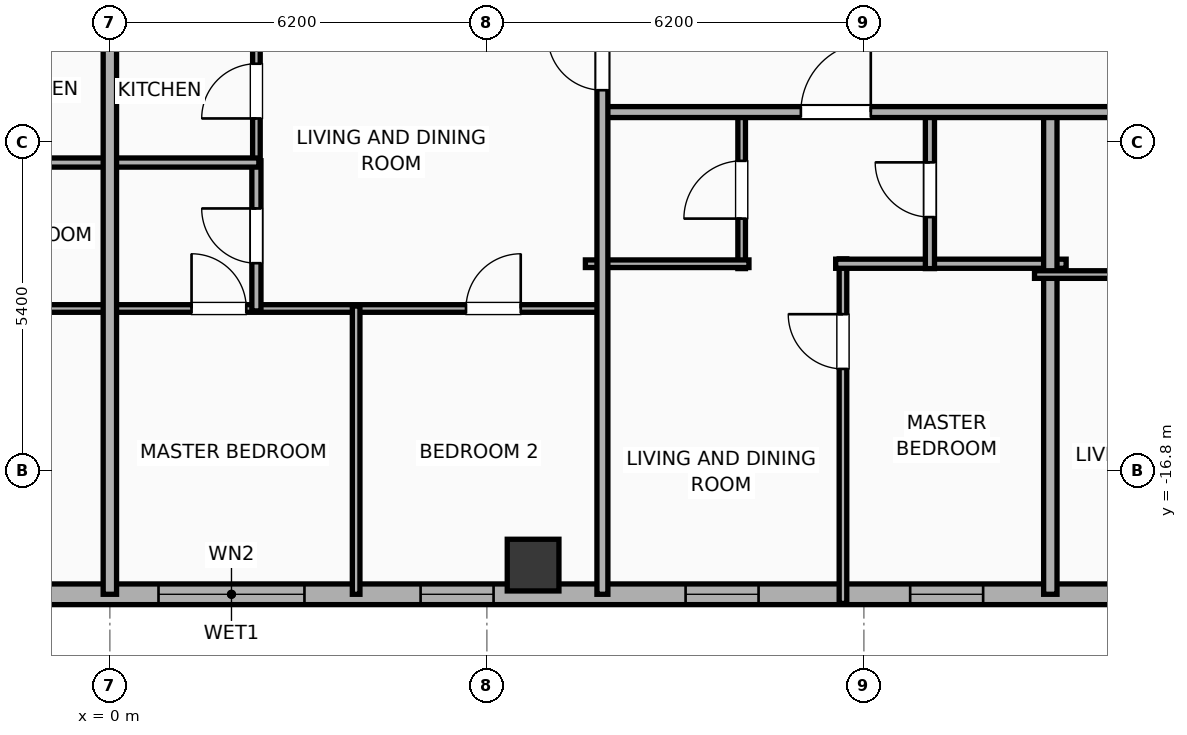
"""IFC4 building model, lengths in metres.
Left out: names, types, materials, properties, quantities, classifications, styles, units other than length and angle.
Written with IfcOpenShell. Run it as: python <this file> out.ifc"""

import sys

from ifc_helpers import new_model, si_unit, direction, frame, frame_2d, origin, origin_2d, place, context, subcontext, project, spatial, rectangle, hollow_rectangle, extrude, element, fill, save


model = new_model("IFC4")
c1 = context("Model", 3, precision=1e-05, world=origin(), true_north=direction((0.0, 1.0)))
c2 = subcontext(c1, "Body", "Model", "MODEL_VIEW")
j1 = project(units=[si_unit("LENGTHUNIT", "METRE"), si_unit("PLANEANGLEUNIT", "RADIAN")], contexts=[c1])
p1 = place(None, origin())
s1 = spatial("IfcSite", under=j1, at=p1, CompositionType="ELEMENT")
p2 = place(p1, origin())
s2 = spatial("IfcBuilding", under=s1, at=p2, CompositionType="ELEMENT")
p3 = place(p2, frame((0.0, 0.0, 243.1)))
s3 = spatial("IfcBuildingStorey", under=s2, at=p3, CompositionType="ELEMENT", Elevation=243.1)
p4 = place(p3, frame((6.96, -18.35, 0.0), z_axis=(0.0, 0.0, 1.0), x_axis=(1.0, 0.0, 0.0)))
e1 = element("IfcColumn", 1, at=p4, inside=s3, PredefinedType="COLUMN", context=c2, shape_type="SweptSolid", body=[
    extrude(hollow_rectangle(XDim=0.85, YDim=0.85, WallThickness=0.028, at=origin_2d()), origin(), (0.0, 0.0, 1.0), 3.9),
])
p5 = place(p3, frame((26.783, -18.83, 0.0), z_axis=(0.0, 0.0, 1.0), x_axis=(-1.0, 0.0, 0.0)))
e2 = element("IfcWall", 2, at=p5, inside=s3, PredefinedType="ELEMENTEDWALL", context=c2, shape_type="SweptSolid", body=[
    extrude(rectangle(XDim=49.566, YDim=0.34, at=frame_2d((24.783, 0.0))), origin(), (0.0, 0.0, 1.0), 3.65),
])
p6 = place(p5, frame((23.583, 0.0, 0.75)))
e3 = element("IfcOpeningElement", 3, at=p6, cuts=e2, PredefinedType="OPENING", context=c2, shape_type="SweptSolid", body=[
    extrude(rectangle(XDim=2.4, YDim=2.1, at=frame_2d((1.2, 1.05))), frame((0.0, 0.18, 0.0), z_axis=(0.0, -1.0, 0.0), x_axis=(1.0, 0.0, 0.0)), (0.0, 0.0, 1.0), 0.36),
])
p7 = place(p5, frame((41.756, 0.0, 0.75)))
e4 = element("IfcOpeningElement", 4, at=p7, cuts=e2, PredefinedType="OPENING", context=c2, shape_type="SweptSolid", body=[
    extrude(rectangle(XDim=2.4, YDim=2.1, at=frame_2d((1.2, 1.05))), frame((0.0, 0.18, 0.0), z_axis=(0.0, -1.0, 0.0), x_axis=(1.0, 0.0, 0.0)), (0.0, 0.0, 1.0), 0.36),
])
p8 = place(p5, frame((47.222, 0.0, 0.75)))
e5 = element("IfcOpeningElement", 5, at=p8, cuts=e2, PredefinedType="OPENING", context=c2, shape_type="SweptSolid", body=[
    extrude(rectangle(XDim=1.2, YDim=2.05, at=frame_2d((0.6, 1.025))), frame((0.0, 0.18, 0.0), z_axis=(0.0, -1.0, 0.0), x_axis=(1.0, 0.0, 0.0)), (0.0, 0.0, 1.0), 0.36),
])
p9 = place(p5, frame((45.263, 0.0, 0.75)))
e6 = element("IfcOpeningElement", 6, at=p9, cuts=e2, PredefinedType="OPENING", context=c2, shape_type="SweptSolid", body=[
    extrude(rectangle(XDim=1.2, YDim=2.05, at=frame_2d((0.6, 1.025))), frame((0.0, 0.18, 0.0), z_axis=(0.0, -1.0, 0.0), x_axis=(1.0, 0.0, 0.0)), (0.0, 0.0, 1.0), 0.36),
])
p10 = place(p5, frame((37.289, 0.0, 0.75)))
e7 = element("IfcOpeningElement", 7, at=p10, cuts=e2, PredefinedType="OPENING", context=c2, shape_type="SweptSolid", body=[
    extrude(rectangle(XDim=1.2, YDim=2.05, at=frame_2d((0.6, 1.025))), frame((0.0, 0.18, 0.0), z_axis=(0.0, -1.0, 0.0), x_axis=(1.0, 0.0, 0.0)), (0.0, 0.0, 1.0), 0.36),
])
p11 = place(p5, frame((16.115, 0.0, 0.75)))
e8 = element("IfcOpeningElement", 8, at=p11, cuts=e2, PredefinedType="OPENING", context=c2, shape_type="SweptSolid", body=[
    extrude(rectangle(XDim=1.2, YDim=2.05, at=frame_2d((0.6, 1.025))), frame((0.0, 0.18, 0.0), z_axis=(0.0, -1.0, 0.0), x_axis=(1.0, 0.0, 0.0)), (0.0, 0.0, 1.0), 0.36),
])
p12 = place(p5, frame((12.422, 0.0, 0.75)))
e9 = element("IfcOpeningElement", 9, at=p12, cuts=e2, PredefinedType="OPENING", context=c2, shape_type="SweptSolid", body=[
    extrude(rectangle(XDim=1.2, YDim=2.05, at=frame_2d((0.6, 1.025))), frame((0.0, 0.18, 0.0), z_axis=(0.0, -1.0, 0.0), x_axis=(1.0, 0.0, 0.0)), (0.0, 0.0, 1.0), 0.36),
])
p13 = place(p5, frame((8.01, 0.0, 0.75)))
e10 = element("IfcOpeningElement", 10, at=p13, cuts=e2, PredefinedType="OPENING", context=c2, shape_type="SweptSolid", body=[
    extrude(rectangle(XDim=1.2, YDim=2.05, at=frame_2d((0.6, 1.025))), frame((0.0, 0.18, 0.0), z_axis=(0.0, -1.0, 0.0), x_axis=(1.0, 0.0, 0.0)), (0.0, 0.0, 1.0), 0.36),
])
p14 = place(p5, frame((5.037, 0.0, 0.75)))
e11 = element("IfcOpeningElement", 11, at=p14, cuts=e2, PredefinedType="OPENING", context=c2, shape_type="SweptSolid", body=[
    extrude(rectangle(XDim=1.2, YDim=2.05, at=frame_2d((0.6, 1.025))), frame((0.0, 0.18, 0.0), z_axis=(0.0, -1.0, 0.0), x_axis=(1.0, 0.0, 0.0)), (0.0, 0.0, 1.0), 0.36),
])
p15 = place(p5, frame((1.811, 0.0, 0.75)))
e12 = element("IfcOpeningElement", 12, at=p15, cuts=e2, PredefinedType="OPENING", context=c2, shape_type="SweptSolid", body=[
    extrude(rectangle(XDim=1.2, YDim=2.05, at=frame_2d((0.6, 1.025))), frame((0.0, 0.18, 0.0), z_axis=(0.0, -1.0, 0.0), x_axis=(1.0, 0.0, 0.0)), (0.0, 0.0, 1.0), 0.36),
])
p16 = place(p5, frame((32.253, 0.0, 0.75)))
e13 = element("IfcOpeningElement", 13, at=p16, cuts=e2, PredefinedType="OPENING", context=c2, shape_type="SweptSolid", body=[
    extrude(rectangle(XDim=1.2, YDim=2.05, at=frame_2d((0.6, 1.025))), frame((0.0, 0.18, 0.0), z_axis=(0.0, -1.0, 0.0), x_axis=(1.0, 0.0, 0.0)), (0.0, 0.0, 1.0), 0.36),
])
p17 = place(p5, frame((27.853, 0.0, 0.75)))
e14 = element("IfcOpeningElement", 14, at=p17, cuts=e2, PredefinedType="OPENING", context=c2, shape_type="SweptSolid", body=[
    extrude(rectangle(XDim=1.2, YDim=2.05, at=frame_2d((0.6, 1.025))), frame((0.0, 0.18, 0.0), z_axis=(0.0, -1.0, 0.0), x_axis=(1.0, 0.0, 0.0)), (0.0, 0.0, 1.0), 0.36),
])
p18 = place(p5, frame((20.473, 0.0, 0.75)))
e15 = element("IfcOpeningElement", 15, at=p18, cuts=e2, PredefinedType="OPENING", context=c2, shape_type="SweptSolid", body=[
    extrude(rectangle(XDim=1.2, YDim=2.05, at=frame_2d((0.6, 1.025))), frame((0.0, 0.18, 0.0), z_axis=(0.0, -1.0, 0.0), x_axis=(1.0, 0.0, 0.0)), (0.0, 0.0, 1.0), 0.36),
])
p19 = place(p3, frame((12.056, -18.98, 0.0), z_axis=(0.0, 0.0, 1.0), x_axis=(0.0, 1.0, 0.0)))
e16 = element("IfcWall", 16, at=p19, inside=s3, PredefinedType="PARTITIONING", context=c2, shape_type="SweptSolid", body=[
    extrude(rectangle(XDim=5.666, YDim=0.125, at=frame_2d((2.833, 0.0))), origin(), (0.0, 0.0, 1.0), 3.65),
])
p20 = place(p19, frame((3.856, 0.0, 0.0)))
e17 = element("IfcOpeningElement", 17, at=p20, cuts=e16, PredefinedType="OPENING", context=c2, shape_type="SweptSolid", body=[
    extrude(rectangle(XDim=0.9, YDim=2.05, at=frame_2d((0.45, 1.025))), frame((0.0, 0.073, 0.0), z_axis=(0.0, -1.0, 0.0), x_axis=(1.0, 0.0, 0.0)), (0.0, 0.0, 1.0), 0.145),
])
p21 = place(p3, frame((11.936, -13.394, 0.0), z_axis=(0.0, 0.0, 1.0), x_axis=(1.0, 0.0, 0.0)))
e18 = element("IfcWall", 18, at=p21, inside=s3, PredefinedType="PLUMBINGWALL", context=c2, shape_type="SweptSolid", body=[
    extrude(rectangle(XDim=3.79, YDim=0.15, at=frame_2d((1.895, 0.0))), origin(), (0.0, 0.0, 1.0), 3.65),
])
p22 = place(p3, frame((10.39, -13.474, 0.0), z_axis=(0.0, 0.0, 1.0), x_axis=(0.0, 1.0, 0.0)))
e19 = element("IfcWall", 19, at=p22, inside=s3, PredefinedType="PARTITIONING", context=c2, shape_type="SweptSolid", body=[
    extrude(rectangle(XDim=2.594, YDim=0.125, at=frame_2d((1.297, 0.0))), origin(), (0.0, 0.0, 1.0), 3.65),
])
p23 = place(p22, frame((0.822, 0.0, 0.0)))
e20 = element("IfcOpeningElement", 20, at=p23, cuts=e19, PredefinedType="OPENING", context=c2, shape_type="SweptSolid", body=[
    extrude(rectangle(XDim=0.95, YDim=2.05, at=frame_2d((0.475, 1.025))), frame((0.0, 0.073, 0.0), z_axis=(0.0, -1.0, 0.0), x_axis=(1.0, 0.0, 0.0)), (0.0, 0.0, 1.0), 0.145),
])
p24 = place(p3, frame((7.82, -13.394, 0.0), z_axis=(0.0, 0.0, 1.0), x_axis=(1.0, 0.0, 0.0)))
e21 = element("IfcWall", 21, at=p24, inside=s3, PredefinedType="PARTITIONING", context=c2, shape_type="SweptSolid", body=[
    extrude(rectangle(XDim=2.69, YDim=0.125, at=frame_2d((1.345, 0.0))), origin(), (0.0, 0.0, 1.0), 3.65),
])
p25 = place(p3, frame((13.486, -13.474, 0.0), z_axis=(0.0, 0.0, 1.0), x_axis=(0.0, 1.0, 0.0)))
e22 = element("IfcWall", 22, at=p25, inside=s3, PredefinedType="PLUMBINGWALL", context=c2, shape_type="SweptSolid", body=[
    extrude(rectangle(XDim=2.594, YDim=0.15, at=frame_2d((1.297, 0.0))), origin(), (0.0, 0.0, 1.0), 3.65),
])
p26 = place(p25, frame((0.847, 0.0, 0.0)))
e23 = element("IfcOpeningElement", 23, at=p26, cuts=e22, PredefinedType="OPENING", context=c2, shape_type="SweptSolid", body=[
    extrude(rectangle(XDim=0.9, YDim=2.05, at=frame_2d((0.45, 1.025))), frame((0.0, 0.085, 0.0), z_axis=(0.0, -1.0, 0.0), x_axis=(1.0, 0.0, 0.0)), (0.0, 0.0, 1.0), 0.17),
])
p27 = place(p3, frame((15.466, -18.83, 0.0), z_axis=(0.0, 0.0, 1.0), x_axis=(0.0, 1.0, 0.0)))
e24 = element("IfcWall", 24, at=p27, inside=s3, PredefinedType="PARTITIONING", context=c2, shape_type="SweptSolid", body=[
    extrude(rectangle(XDim=8.01, YDim=0.22, at=frame_2d((4.005, 0.0))), origin(), (0.0, 0.0, 1.0), 3.65),
])
p28 = place(p3, frame((15.206, -13.572, 0.0), z_axis=(0.0, 0.0, 1.0), x_axis=(1.0, 0.0, 0.0)))
e25 = element("IfcWall", 25, at=p28, inside=s3, PredefinedType="PARTITIONING", context=c2, shape_type="SweptSolid", body=[
    extrude(rectangle(XDim=2.69, YDim=0.125, at=frame_2d((1.345, 0.0))), origin(), (0.0, 0.0, 1.0), 3.65),
])
p29 = place(p3, frame((8.08, -10.9, 0.0), z_axis=(0.0, 0.0, 1.0), x_axis=(1.0, 0.0, 0.0)))
e26 = element("IfcWall", 26, at=p29, inside=s3, PredefinedType="PARTITIONING", context=c2, shape_type="SweptSolid", body=[
    extrude(rectangle(XDim=22.15, YDim=0.18, at=frame_2d((11.075, 0.0))), origin(), (0.0, 0.0, 1.0), 3.65),
])
p30 = place(p29, frame((3.283, 0.0, 0.0)))
e27 = element("IfcOpeningElement", 27, at=p30, cuts=e26, PredefinedType="OPENING", context=c2, shape_type="SweptSolid", body=[
    extrude(rectangle(XDim=1.15, YDim=2.05, at=frame_2d((0.575, 1.025))), frame((0.0, 0.1, 0.0), z_axis=(0.0, -1.0, 0.0), x_axis=(1.0, 0.0, 0.0)), (0.0, 0.0, 1.0), 0.2),
])
p31 = place(p29, frame((10.668, 0.0, 0.0)))
e28 = element("IfcOpeningElement", 28, at=p31, cuts=e26, PredefinedType="OPENING", context=c2, shape_type="SweptSolid", body=[
    extrude(rectangle(XDim=1.15, YDim=2.05, at=frame_2d((0.575, 1.025))), frame((0.0, 0.1, 0.0), z_axis=(0.0, -1.0, 0.0), x_axis=(1.0, 0.0, 0.0)), (0.0, 0.0, 1.0), 0.2),
])
p32 = place(p29, frame((18.084, 0.0, 0.0)))
e29 = element("IfcOpeningElement", 29, at=p32, cuts=e26, PredefinedType="OPENING", context=c2, shape_type="SweptSolid", body=[
    extrude(rectangle(XDim=1.15, YDim=2.05, at=frame_2d((0.575, 1.025))), frame((0.0, 0.1, 0.0), z_axis=(0.0, -1.0, 0.0), x_axis=(1.0, 0.0, 0.0)), (0.0, 0.0, 1.0), 0.2),
])
p33 = place(p3, frame((-8.08, -14.13, 0.0), z_axis=(0.0, 0.0, 1.0), x_axis=(1.0, 0.0, 0.0)))
e30 = element("IfcWall", 30, at=p33, inside=s3, PredefinedType="PARTITIONING", context=c2, shape_type="SweptSolid", body=[
    extrude(rectangle(XDim=8.06, YDim=0.125, at=frame_2d((4.03, 0.0))), origin(), (0.0, 0.0, 1.0), 3.65),
])
p34 = place(p33, frame((1.323, 0.0, 0.0)))
e31 = element("IfcOpeningElement", 31, at=p34, cuts=e30, PredefinedType="OPENING", context=c2, shape_type="SweptSolid", body=[
    extrude(rectangle(XDim=0.9, YDim=2.05, at=frame_2d((0.45, 1.025))), frame((0.0, 0.073, 0.0), z_axis=(0.0, -1.0, 0.0), x_axis=(1.0, 0.0, 0.0)), (0.0, 0.0, 1.0), 0.145),
])
p35 = place(p33, frame((4.547, 0.0, 0.0)))
e32 = element("IfcOpeningElement", 32, at=p35, cuts=e30, PredefinedType="OPENING", context=c2, shape_type="SweptSolid", body=[
    extrude(rectangle(XDim=0.9, YDim=2.05, at=frame_2d((0.45, 1.025))), frame((0.0, 0.073, 0.0), z_axis=(0.0, -1.0, 0.0), x_axis=(1.0, 0.0, 0.0)), (0.0, 0.0, 1.0), 0.145),
])
p36 = place(p3, frame((-2.45, -11.73, 0.0), z_axis=(0.0, 0.0, 1.0), x_axis=(1.0, 0.0, 0.0)))
e33 = element("IfcWall", 33, at=p36, inside=s3, PredefinedType="PLUMBINGWALL", context=c2, shape_type="SweptSolid", body=[
    extrude(rectangle(XDim=2.43, YDim=0.15, at=frame_2d((1.215, 0.0))), origin(), (0.0, 0.0, 1.0), 3.65),
])
p37 = place(p3, frame((0.02, -14.13, 0.0), z_axis=(0.0, 0.0, 1.0), x_axis=(1.0, 0.0, 0.0)))
e34 = element("IfcWall", 34, at=p37, inside=s3, PredefinedType="PARTITIONING", context=c2, shape_type="SweptSolid", body=[
    extrude(rectangle(XDim=8.06, YDim=0.125, at=frame_2d((4.03, 0.0))), origin(), (0.0, 0.0, 1.0), 3.65),
])
p38 = place(p37, frame((1.323, 0.0, 0.0)))
e35 = element("IfcOpeningElement", 35, at=p38, cuts=e34, PredefinedType="OPENING", context=c2, shape_type="SweptSolid", body=[
    extrude(rectangle(XDim=0.9, YDim=2.05, at=frame_2d((0.45, 1.025))), frame((0.0, 0.073, 0.0), z_axis=(0.0, -1.0, 0.0), x_axis=(1.0, 0.0, 0.0)), (0.0, 0.0, 1.0), 0.145),
])
p39 = place(p37, frame((5.837, 0.0, 0.0)))
e36 = element("IfcOpeningElement", 36, at=p39, cuts=e34, PredefinedType="OPENING", context=c2, shape_type="SweptSolid", body=[
    extrude(rectangle(XDim=0.9, YDim=2.05, at=frame_2d((0.45, 1.025))), frame((0.0, 0.073, 0.0), z_axis=(0.0, -1.0, 0.0), x_axis=(1.0, 0.0, 0.0)), (0.0, 0.0, 1.0), 0.145),
])
p40 = place(p3, frame((2.41, -11.76, 0.0), z_axis=(0.0, 0.0, 1.0), x_axis=(0.0, 1.0, 0.0)))
e37 = element("IfcWall", 37, at=p40, inside=s3, PredefinedType="PARTITIONING", context=c2, shape_type="SweptSolid", body=[
    extrude(rectangle(XDim=2.41, YDim=0.125, at=frame_2d((1.205, 0.0))), origin(), (0.0, 0.0, 1.0), 3.65),
])
p41 = place(p40, frame((0.755, 0.0, 0.0)))
e38 = element("IfcOpeningElement", 38, at=p41, cuts=e37, PredefinedType="OPENING", context=c2, shape_type="SweptSolid", body=[
    extrude(rectangle(XDim=0.9, YDim=2.05, at=frame_2d((0.45, 1.025))), frame((0.0, 0.073, 0.0), z_axis=(0.0, -1.0, 0.0), x_axis=(1.0, 0.0, 0.0)), (0.0, 0.0, 1.0), 0.145),
])
p42 = place(p3, frame((2.41, -14.17, 0.0), z_axis=(0.0, 0.0, 1.0), x_axis=(0.0, 1.0, 0.0)))
e39 = element("IfcWall", 39, at=p42, inside=s3, PredefinedType="PLUMBINGWALL", context=c2, shape_type="SweptSolid", body=[
    extrude(rectangle(XDim=2.47, YDim=0.15, at=frame_2d((1.235, 0.0))), origin(), (0.0, 0.0, 1.0), 3.65),
])
p43 = place(p42, frame((0.785, 0.0, 0.0)))
e40 = element("IfcOpeningElement", 40, at=p43, cuts=e39, PredefinedType="OPENING", context=c2, shape_type="SweptSolid", body=[
    extrude(rectangle(XDim=0.9, YDim=2.05, at=frame_2d((0.45, 1.025))), frame((0.0, 0.085, 0.0), z_axis=(0.0, -1.0, 0.0), x_axis=(1.0, 0.0, 0.0)), (0.0, 0.0, 1.0), 0.17),
])
p44 = place(p3, frame((0.02, -11.73, 0.0), z_axis=(0.0, 0.0, 1.0), x_axis=(1.0, 0.0, 0.0)))
e41 = element("IfcWall", 41, at=p44, inside=s3, PredefinedType="PLUMBINGWALL", context=c2, shape_type="SweptSolid", body=[
    extrude(rectangle(XDim=2.43, YDim=0.15, at=frame_2d((1.215, 0.0))), origin(), (0.0, 0.0, 1.0), 3.65),
])
p45 = place(p3, frame((4.05, -18.83, 0.0), z_axis=(0.0, 0.0, 1.0), x_axis=(0.0, 1.0, 0.0)))
e42 = element("IfcWall", 42, at=p45, inside=s3, PredefinedType="PARTITIONING", context=c2, shape_type="SweptSolid", body=[
    extrude(rectangle(XDim=4.74, YDim=0.125, at=frame_2d((2.37, 0.0))), origin(), (0.0, 0.0, 1.0), 3.65),
])
p46 = place(p3, frame((8.1, -18.83, 0.0), z_axis=(0.0, 0.0, 1.0), x_axis=(0.0, 1.0, 0.0)))
e43 = element("IfcWall", 43, at=p46, inside=s3, PredefinedType="PARTITIONING", context=c2, shape_type="SweptSolid", body=[
    extrude(rectangle(XDim=9.54, YDim=0.18, at=frame_2d((4.77, 0.0))), origin(), (0.0, 0.0, 1.0), 3.65),
])
p47 = place(p46, frame((8.29, 0.0, 0.0)))
e44 = element("IfcOpeningElement", 44, at=p47, cuts=e43, PredefinedType="OPENING", context=c2, shape_type="SweptSolid", body=[
    extrude(rectangle(XDim=0.9, YDim=2.05, at=frame_2d((0.45, 1.025))), frame((0.0, 0.1, 0.0), z_axis=(0.0, -1.0, 0.0), x_axis=(1.0, 0.0, 0.0)), (0.0, 0.0, 1.0), 0.2),
])
p48 = place(p3, frame((0.0, -18.83, 0.0), z_axis=(0.0, 0.0, 1.0), x_axis=(0.0, 1.0, 0.0)))
e45 = element("IfcWall", 45, at=p48, inside=s3, PredefinedType="PARTITIONING", context=c2, shape_type="SweptSolid", body=[
    extrude(rectangle(XDim=9.54, YDim=0.22, at=frame_2d((4.77, 0.0))), origin(), (0.0, 0.0, 1.0), 3.65),
])
p49 = place(p6, origin())
e46 = element("IfcWindow", 46, at=p49, inside=s3, PartitioningType="SINGLE_PANEL", PredefinedType="WINDOW", context=c2, shape_type="SweptSolid", body=[
    extrude(rectangle(XDim=2.4, YDim=2.1, at=frame_2d((1.2, 1.05))), frame((0.0, 0.03, 0.0), z_axis=(0.0, -1.0, 0.0), x_axis=(1.0, 0.0, 0.0)), (0.0, 0.0, 1.0), 0.06),
])
fill(e3, e46)
p50 = place(p11, origin())
e47 = element("IfcWindow", 47, at=p50, inside=s3, PartitioningType="SINGLE_PANEL", PredefinedType="WINDOW", context=c2, shape_type="SweptSolid", body=[
    extrude(rectangle(XDim=1.2, YDim=2.05, at=frame_2d((0.6, 1.025))), frame((0.0, 0.03, 0.0), z_axis=(0.0, -1.0, 0.0), x_axis=(1.0, 0.0, 0.0)), (0.0, 0.0, 1.0), 0.06),
])
fill(e8, e47)
p51 = place(p12, origin())
e48 = element("IfcWindow", 48, at=p51, inside=s3, PartitioningType="SINGLE_PANEL", PredefinedType="WINDOW", context=c2, shape_type="SweptSolid", body=[
    extrude(rectangle(XDim=1.2, YDim=2.05, at=frame_2d((0.6, 1.025))), frame((0.0, 0.03, 0.0), z_axis=(0.0, -1.0, 0.0), x_axis=(1.0, 0.0, 0.0)), (0.0, 0.0, 1.0), 0.06),
])
fill(e9, e48)
p52 = place(p18, origin())
e49 = element("IfcWindow", 49, at=p52, inside=s3, PartitioningType="SINGLE_PANEL", PredefinedType="WINDOW", context=c2, shape_type="SweptSolid", body=[
    extrude(rectangle(XDim=1.2, YDim=2.05, at=frame_2d((0.6, 1.025))), frame((0.0, 0.03, 0.0), z_axis=(0.0, -1.0, 0.0), x_axis=(1.0, 0.0, 0.0)), (0.0, 0.0, 1.0), 0.06),
])
fill(e15, e49)
p53 = place(p20, origin())
e50 = element("IfcDoor", 50, at=p53, inside=s3, OperationType="SINGLE_SWING_RIGHT", PredefinedType="DOOR", context=c2, shape_type="SweptSolid", body=[
    extrude(rectangle(XDim=0.9, YDim=2.05, at=frame_2d((0.45, 1.025))), frame((0.0, 0.025, 0.0), z_axis=(0.0, -1.0, 0.0), x_axis=(1.0, 0.0, 0.0)), (0.0, 0.0, 1.0), 0.05),
])
fill(e17, e50)
p54 = place(p23, origin())
e51 = element("IfcDoor", 51, at=p54, inside=s3, OperationType="SINGLE_SWING_LEFT", PredefinedType="DOOR", context=c2, shape_type="SweptSolid", body=[
    extrude(rectangle(XDim=0.95, YDim=2.05, at=frame_2d((0.475, 1.025))), frame((0.0, 0.025, 0.0), z_axis=(0.0, -1.0, 0.0), x_axis=(1.0, 0.0, 0.0)), (0.0, 0.0, 1.0), 0.05),
])
fill(e20, e51)
p55 = place(p26, origin())
e52 = element("IfcDoor", 52, at=p55, inside=s3, OperationType="SINGLE_SWING_RIGHT", PredefinedType="DOOR", context=c2, shape_type="SweptSolid", body=[
    extrude(rectangle(XDim=0.9, YDim=2.05, at=frame_2d((0.45, 1.025))), frame((0.0, 0.025, 0.0), z_axis=(0.0, -1.0, 0.0), x_axis=(1.0, 0.0, 0.0)), (0.0, 0.0, 1.0), 0.05),
])
fill(e23, e52)
p56 = place(p30, origin())
e53 = element("IfcDoor", 53, at=p56, inside=s3, OperationType="SINGLE_SWING_RIGHT", PredefinedType="DOOR", context=c2, shape_type="SweptSolid", body=[
    extrude(rectangle(XDim=1.15, YDim=2.05, at=frame_2d((0.575, 1.025))), frame((0.0, 0.025, 0.0), z_axis=(0.0, -1.0, 0.0), x_axis=(1.0, 0.0, 0.0)), (0.0, 0.0, 1.0), 0.05),
])
fill(e27, e53)
p57 = place(p38, origin())
e54 = element("IfcDoor", 54, at=p57, inside=s3, OperationType="SINGLE_SWING_LEFT", PredefinedType="DOOR", context=c2, shape_type="SweptSolid", body=[
    extrude(rectangle(XDim=0.9, YDim=2.05, at=frame_2d((0.45, 1.025))), frame((0.0, 0.025, 0.0), z_axis=(0.0, -1.0, 0.0), x_axis=(1.0, 0.0, 0.0)), (0.0, 0.0, 1.0), 0.05),
])
fill(e35, e54)
p58 = place(p39, origin())
e55 = element("IfcDoor", 55, at=p58, inside=s3, OperationType="SINGLE_SWING_RIGHT", PredefinedType="DOOR", context=c2, shape_type="SweptSolid", body=[
    extrude(rectangle(XDim=0.9, YDim=2.05, at=frame_2d((0.45, 1.025))), frame((0.0, 0.025, 0.0), z_axis=(0.0, -1.0, 0.0), x_axis=(1.0, 0.0, 0.0)), (0.0, 0.0, 1.0), 0.05),
])
fill(e36, e55)
p59 = place(p41, origin())
e56 = element("IfcDoor", 56, at=p59, inside=s3, OperationType="SINGLE_SWING_LEFT", PredefinedType="DOOR", context=c2, shape_type="SweptSolid", body=[
    extrude(rectangle(XDim=0.9, YDim=2.05, at=frame_2d((0.45, 1.025))), frame((0.0, 0.025, 0.0), z_axis=(0.0, -1.0, 0.0), x_axis=(1.0, 0.0, 0.0)), (0.0, 0.0, 1.0), 0.05),
])
fill(e38, e56)
p60 = place(p43, origin())
e57 = element("IfcDoor", 57, at=p60, inside=s3, OperationType="SINGLE_SWING_RIGHT", PredefinedType="DOOR", context=c2, shape_type="SweptSolid", body=[
    extrude(rectangle(XDim=0.9, YDim=2.05, at=frame_2d((0.45, 1.025))), frame((0.0, 0.025, 0.0), z_axis=(0.0, -1.0, 0.0), x_axis=(1.0, 0.0, 0.0)), (0.0, 0.0, 1.0), 0.05),
])
fill(e40, e57)
p61 = place(p47, origin())
e58 = element("IfcDoor", 58, at=p61, inside=s3, OperationType="SINGLE_SWING_RIGHT", PredefinedType="DOOR", context=c2, shape_type="SweptSolid", body=[
    extrude(rectangle(XDim=0.9, YDim=2.05, at=frame_2d((0.45, 1.025))), frame((0.0, 0.025, 0.0), z_axis=(0.0, -1.0, 0.0), x_axis=(1.0, 0.0, 0.0)), (0.0, 0.0, 1.0), 0.05),
])
fill(e44, e58)
save(model, sys.argv[1])
